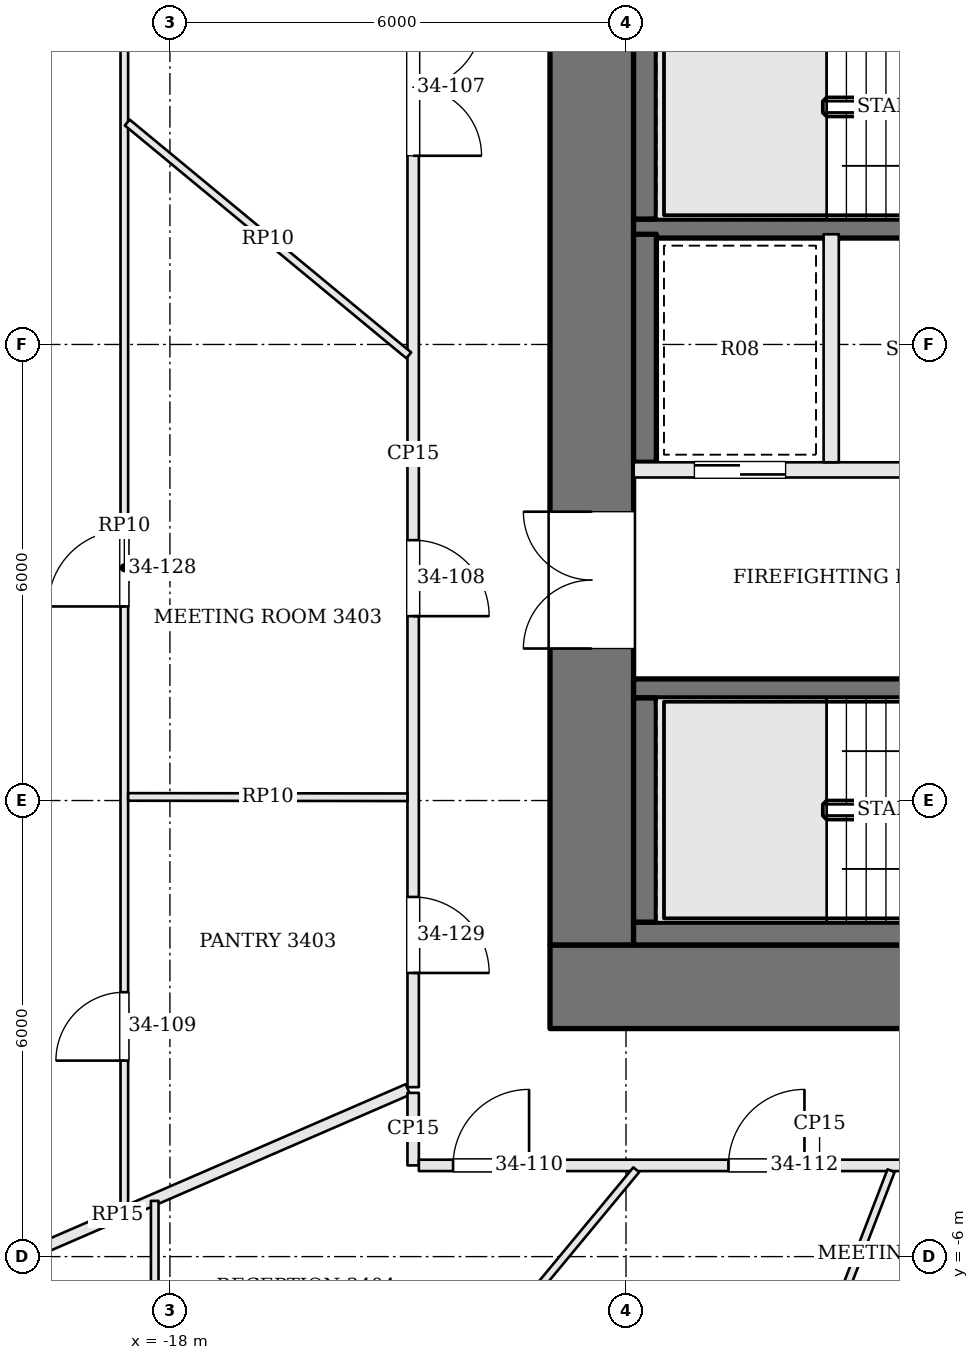
"""IFC4 building model, lengths in metres.
Left out: names, types, materials, properties, quantities, classifications, styles, units other than length and angle.
Written with IfcOpenShell. Run it as: python <this file> out.ifc"""

import sys

from ifc_helpers import new_model, si_unit, direction, frame, frame_2d, origin, place, context, subcontext, project, spatial, rectangle, extrude, element, fill, save


model = new_model("IFC4")
c1 = context("Model", 3, precision=1e-05, world=origin(), true_north=direction((0.0, 1.0)))
c2 = subcontext(c1, "Body", "Model", "MODEL_VIEW")
j1 = project(units=[si_unit("LENGTHUNIT", "METRE"), si_unit("PLANEANGLEUNIT", "RADIAN")], contexts=[c1])
p1 = place(None, origin())
s1 = spatial("IfcSite", under=j1, at=p1, CompositionType="ELEMENT")
p2 = place(p1, origin())
s2 = spatial("IfcBuilding", under=s1, at=p2, CompositionType="ELEMENT")
p3 = place(p2, frame((0.0, 0.0, 142.2)))
s3 = spatial("IfcBuildingStorey", under=s2, at=p3, CompositionType="ELEMENT", Elevation=142.2)
p4 = place(p3, frame((-13.0, -2.45, 0.0), z_axis=(0.0, 0.0, 1.0), x_axis=(1.0, 0.0, 0.0)))
e1 = element("IfcWall", 1, at=p4, inside=s3, PredefinedType="SHEAR", context=c2, shape_type="SweptSolid", body=[
    extrude(rectangle(XDim=26.0, YDim=1.1, at=frame_2d((13.0, 0.0))), origin(), (0.0, 0.0, 1.0), 3.9),
])
p5 = place(p4, frame((9.275, 0.0, 0.0)))
e2 = element("IfcOpeningElement", 2, at=p5, cuts=e1, PredefinedType="OPENING", context=c2, shape_type="SweptSolid", body=[
    extrude(rectangle(XDim=0.9, YDim=2.1, at=frame_2d((0.45, 1.05))), frame((0.0, 0.56, 0.0), z_axis=(0.0, -1.0, 0.0), x_axis=(1.0, 0.0, 0.0)), (0.0, 0.0, 1.0), 1.12),
])
p6 = place(p4, frame((11.75, 0.0, 0.0)))
e3 = element("IfcOpeningElement", 3, at=p6, cuts=e1, PredefinedType="OPENING", context=c2, shape_type="SweptSolid", body=[
    extrude(rectangle(XDim=1.0, YDim=2.1, at=frame_2d((0.5, 1.05))), frame((0.0, 0.56, 0.0), z_axis=(0.0, -1.0, 0.0), x_axis=(1.0, 0.0, 0.0)), (0.0, 0.0, 1.0), 1.12),
])
p7 = place(p4, frame((14.325, 0.0, 0.0)))
e4 = element("IfcOpeningElement", 4, at=p7, cuts=e1, PredefinedType="OPENING", context=c2, shape_type="SweptSolid", body=[
    extrude(rectangle(XDim=0.9, YDim=2.1, at=frame_2d((0.45, 1.05))), frame((0.0, 0.56, 0.0), z_axis=(0.0, -1.0, 0.0), x_axis=(1.0, 0.0, 0.0)), (0.0, 0.0, 1.0), 1.12),
])
p8 = place(p4, frame((16.7, 0.0, 0.0)))
e5 = element("IfcOpeningElement", 5, at=p8, cuts=e1, PredefinedType="OPENING", context=c2, shape_type="SweptSolid", body=[
    extrude(rectangle(XDim=0.9, YDim=2.1, at=frame_2d((0.45, 1.05))), frame((0.0, 0.56, 0.0), z_axis=(0.0, -1.0, 0.0), x_axis=(1.0, 0.0, 0.0)), (0.0, 0.0, 1.0), 1.12),
])
p9 = place(p3, frame((-12.45, -1.9, 0.0), z_axis=(0.0, 0.0, 1.0), x_axis=(0.0, 1.0, 0.0)))
e6 = element("IfcWall", 6, at=p9, inside=s3, PredefinedType="SHEAR", context=c2, shape_type="SweptSolid", body=[
    extrude(rectangle(XDim=12.8, YDim=1.1, at=frame_2d((6.4, 0.0))), origin(), (0.0, 0.0, 1.0), 3.9),
])
p10 = place(p9, frame((3.9, 0.0, 0.0)))
e7 = element("IfcOpeningElement", 7, at=p10, cuts=e6, PredefinedType="OPENING", context=c2, shape_type="SweptSolid", body=[
    extrude(rectangle(XDim=1.8, YDim=2.1, at=frame_2d((0.9, 1.05))), frame((0.0, 0.56, 0.0), z_axis=(0.0, -1.0, 0.0), x_axis=(1.0, 0.0, 0.0)), (0.0, 0.0, 1.0), 1.12),
])
p11 = place(p3, frame((-11.9, 1.475, 0.0), z_axis=(0.0, 0.0, 1.0), x_axis=(1.0, 0.0, 0.0)))
e8 = element("IfcWall", 8, at=p11, inside=s3, PredefinedType="SOLIDWALL", context=c2, shape_type="SweptSolid", body=[
    extrude(rectangle(XDim=6.8, YDim=0.25, at=frame_2d((3.4, 0.0))), origin(), (0.0, 0.0, 1.0), 3.7),
])
p12 = place(p11, frame((5.5, 0.0, 0.0)))
e9 = element("IfcOpeningElement", 9, at=p12, cuts=e8, PredefinedType="OPENING", context=c2, shape_type="SweptSolid", body=[
    extrude(rectangle(XDim=1.2, YDim=2.1, at=frame_2d((0.6, 1.05))), frame((0.0, 0.135, 0.0), z_axis=(0.0, -1.0, 0.0), x_axis=(1.0, 0.0, 0.0)), (0.0, 0.0, 1.0), 0.27),
])
p13 = place(p3, frame((-11.9, 4.35, 0.0), z_axis=(0.0, 0.0, 1.0), x_axis=(1.0, 0.0, 0.0)))
e10 = element("IfcWall", 10, at=p13, inside=s3, PredefinedType="SOLIDWALL", context=c2, shape_type="SweptSolid", body=[
    extrude(rectangle(XDim=6.8, YDim=0.2, at=frame_2d((3.4, 0.0))), origin(), (0.0, 0.0, 1.0), 3.7),
])
p14 = place(p13, frame((4.1, 0.0, 0.0)))
e11 = element("IfcOpeningElement", 11, at=p14, cuts=e10, PredefinedType="OPENING", context=c2, shape_type="SweptSolid", body=[
    extrude(rectangle(XDim=1.2, YDim=2.1, at=frame_2d((0.6, 1.05))), frame((0.0, 0.11, 0.0), z_axis=(0.0, -1.0, 0.0), x_axis=(1.0, 0.0, 0.0)), (0.0, 0.0, 1.0), 0.22),
])
p15 = place(p13, frame((0.8, 0.0, 0.0)))
e12 = element("IfcOpeningElement", 12, at=p15, cuts=e10, PredefinedType="OPENING", context=c2, shape_type="SweptSolid", body=[
    extrude(rectangle(XDim=1.2, YDim=2.1, at=frame_2d((0.6, 1.05))), frame((0.0, 0.11, 0.0), z_axis=(0.0, -1.0, 0.0), x_axis=(1.0, 0.0, 0.0)), (0.0, 0.0, 1.0), 0.22),
])
p16 = place(p3, frame((-11.9, 7.525, 0.0), z_axis=(0.0, 0.0, 1.0), x_axis=(1.0, 0.0, 0.0)))
e13 = element("IfcWall", 13, at=p16, inside=s3, PredefinedType="SOLIDWALL", context=c2, shape_type="SweptSolid", body=[
    extrude(rectangle(XDim=6.8, YDim=0.25, at=frame_2d((3.4, 0.0))), origin(), (0.0, 0.0, 1.0), 3.7),
])
p17 = place(p16, frame((5.5, 0.0, 0.0)))
e14 = element("IfcOpeningElement", 14, at=p17, cuts=e13, PredefinedType="OPENING", context=c2, shape_type="SweptSolid", body=[
    extrude(rectangle(XDim=1.2, YDim=2.1, at=frame_2d((0.6, 1.05))), frame((0.0, 0.135, 0.0), z_axis=(0.0, -1.0, 0.0), x_axis=(1.0, 0.0, 0.0)), (0.0, 0.0, 1.0), 0.27),
])
p18 = place(p3, frame((-9.3, 4.45, 0.0), z_axis=(0.0, 0.0, 1.0), x_axis=(0.0, 1.0, 0.0)))
e15 = element("IfcWall", 15, at=p18, inside=s3, PredefinedType="SOLIDWALL", context=c2, shape_type="SweptSolid", body=[
    extrude(rectangle(XDim=3.0, YDim=0.2, at=frame_2d((1.5, 0.0))), origin(), (0.0, 0.0, 1.0), 3.7),
])
p19 = place(p3, frame((-11.9, -1.75, 0.0), z_axis=(0.0, 0.0, 1.0), x_axis=(1.0, 0.0, 0.0)))
e16 = element("IfcWall", 16, at=p19, inside=s3, PredefinedType="SOLIDWALL", context=c2, shape_type="SweptSolid", body=[
    extrude(rectangle(XDim=6.8, YDim=0.3, at=frame_2d((3.4, 0.0))), origin(), (0.0, 0.0, 1.0), 3.7),
])
p20 = place(p3, frame((-11.75, -1.6, 0.0), z_axis=(0.0, 0.0, 1.0), x_axis=(0.0, 1.0, 0.0)))
e17 = element("IfcWall", 17, at=p20, inside=s3, PredefinedType="SOLIDWALL", context=c2, shape_type="SweptSolid", body=[
    extrude(rectangle(XDim=2.95, YDim=0.3, at=frame_2d((1.475, 0.0))), origin(), (0.0, 0.0, 1.0), 3.7),
])
p21 = place(p3, frame((-11.75, 4.45, 0.0), z_axis=(0.0, 0.0, 1.0), x_axis=(0.0, 1.0, 0.0)))
e18 = element("IfcWall", 18, at=p21, inside=s3, PredefinedType="SOLIDWALL", context=c2, shape_type="SweptSolid", body=[
    extrude(rectangle(XDim=3.0, YDim=0.3, at=frame_2d((1.5, 0.0))), origin(), (0.0, 0.0, 1.0), 3.7),
])
p22 = place(p3, frame((-11.75, 7.65, 0.0), z_axis=(0.0, 0.0, 1.0), x_axis=(0.0, 1.0, 0.0)))
e19 = element("IfcWall", 19, at=p22, inside=s3, PredefinedType="SOLIDWALL", context=c2, shape_type="SweptSolid", body=[
    extrude(rectangle(XDim=2.95, YDim=0.3, at=frame_2d((1.475, 0.0))), origin(), (0.0, 0.0, 1.0), 3.7),
])
p23 = place(p3, frame((-14.8, 12.882, 0.0), z_axis=(0.0, 0.0, 1.0), x_axis=(0.0, -1.0, 0.0)))
e20 = element("IfcWall", 20, at=p23, inside=s3, PredefinedType="PARTITIONING", context=c2, shape_type="SweptSolid", body=[
    extrude(rectangle(XDim=16.652, YDim=0.15, at=frame_2d((8.326, 0.0))), origin(), (0.0, 0.0, 1.0), 3.198),
])
p24 = place(p23, frame((2.599, 0.0, 0.0)))
e21 = element("IfcOpeningElement", 21, at=p24, cuts=e20, PredefinedType="OPENING", context=c2, shape_type="SweptSolid", body=[
    extrude(rectangle(XDim=1.8, YDim=2.1, at=frame_2d((0.9, 1.05))), frame((0.0, 0.085, 0.0), z_axis=(0.0, -1.0, 0.0), x_axis=(1.0, 0.0, 0.0)), (0.0, 0.0, 1.0), 0.17),
])
p25 = place(p23, frame((9.456, 0.0, 0.0)))
e22 = element("IfcOpeningElement", 22, at=p25, cuts=e20, PredefinedType="OPENING", context=c2, shape_type="SweptSolid", body=[
    extrude(rectangle(XDim=1.0, YDim=2.4, at=frame_2d((0.5, 1.2))), frame((0.0, 0.085, 0.0), z_axis=(0.0, -1.0, 0.0), x_axis=(1.0, 0.0, 0.0)), (0.0, 0.0, 1.0), 0.17),
])
p26 = place(p23, frame((14.15, 0.0, 0.0)))
e23 = element("IfcOpeningElement", 23, at=p26, cuts=e20, PredefinedType="OPENING", context=c2, shape_type="SweptSolid", body=[
    extrude(rectangle(XDim=1.0, YDim=2.1, at=frame_2d((0.5, 1.05))), frame((0.0, 0.085, 0.0), z_axis=(0.0, -1.0, 0.0), x_axis=(1.0, 0.0, 0.0)), (0.0, 0.0, 1.0), 0.17),
])
p27 = place(p3, frame((-22.514, -7.116, 0.0), z_axis=(0.0, 0.0, 1.0), x_axis=(0.917457618692, 0.397833530392, 0.0)))
e24 = element("IfcWall", 24, at=p27, inside=s3, PredefinedType="PARTITIONING", context=c2, shape_type="SweptSolid", body=[
    extrude(rectangle(XDim=8.333, YDim=0.15, at=frame_2d((4.167, 0.0))), origin(), (0.0, 0.0, 1.0), 3.198),
])
p28 = place(p3, frame((-14.8, -3.846, 0.0), z_axis=(0.0, 0.0, 1.0), x_axis=(0.0, -1.0, 0.0)))
e25 = element("IfcWall", 25, at=p28, inside=s3, PredefinedType="PARTITIONING", context=c2, shape_type="SweptSolid", body=[
    extrude(rectangle(XDim=0.954, YDim=0.15, at=frame_2d((0.477, 0.0))), origin(), (0.0, 0.0, 1.0), 3.198),
])
p29 = place(p3, frame((-14.725, -4.8, 0.0), z_axis=(0.0, 0.0, 1.0), x_axis=(1.0, 0.0, 0.0)))
e26 = element("IfcWall", 26, at=p29, inside=s3, PredefinedType="PARTITIONING", context=c2, shape_type="SweptSolid", body=[
    extrude(rectangle(XDim=10.544, YDim=0.15, at=frame_2d((5.272, 0.0))), origin(), (0.0, 0.0, 1.0), 3.198),
])
p30 = place(p29, frame((0.45, 0.0, 0.0)))
e27 = element("IfcOpeningElement", 27, at=p30, cuts=e26, PredefinedType="OPENING", context=c2, shape_type="SweptSolid", body=[
    extrude(rectangle(XDim=1.0, YDim=2.1, at=frame_2d((0.5, 1.05))), frame((0.0, 0.085, 0.0), z_axis=(0.0, -1.0, 0.0), x_axis=(1.0, 0.0, 0.0)), (0.0, 0.0, 1.0), 0.17),
])
p31 = place(p29, frame((4.073, 0.0, 0.0)))
e28 = element("IfcOpeningElement", 28, at=p31, cuts=e26, PredefinedType="OPENING", context=c2, shape_type="SweptSolid", body=[
    extrude(rectangle(XDim=1.0, YDim=2.4, at=frame_2d((0.5, 1.2))), frame((0.0, 0.085, 0.0), z_axis=(0.0, -1.0, 0.0), x_axis=(1.0, 0.0, 0.0)), (0.0, 0.0, 1.0), 0.17),
])
p32 = place(p29, frame((6.764, 0.0, 0.0)))
e29 = element("IfcOpeningElement", 29, at=p32, cuts=e26, PredefinedType="OPENING", context=c2, shape_type="SweptSolid", body=[
    extrude(rectangle(XDim=1.0, YDim=2.4, at=frame_2d((0.5, 1.2))), frame((0.0, 0.085, 0.0), z_axis=(0.0, -1.0, 0.0), x_axis=(1.0, 0.0, 0.0)), (0.0, 0.0, 1.0), 0.17),
])
p33 = place(p29, frame((8.916, 0.0, 0.0)))
e30 = element("IfcOpeningElement", 30, at=p33, cuts=e26, PredefinedType="OPENING", context=c2, shape_type="SweptSolid", body=[
    extrude(rectangle(XDim=1.0, YDim=2.4, at=frame_2d((0.5, 1.2))), frame((0.0, 0.085, 0.0), z_axis=(0.0, -1.0, 0.0), x_axis=(1.0, 0.0, 0.0)), (0.0, 0.0, 1.0), 0.17),
])
p34 = place(p3, frame((-18.6, -5.397, 0.0), z_axis=(0.0, 0.0, 1.0), x_axis=(0.0, 1.0, 0.0)))
e31 = element("IfcWall", 31, at=p34, inside=s3, PredefinedType="PARTITIONING", context=c2, shape_type="SweptSolid", body=[
    extrude(rectangle(XDim=16.919, YDim=0.1, at=frame_2d((8.459, 0.0))), origin(), (0.0, 0.0, 1.0), 3.184),
])
p35 = place(p34, frame((1.975, 0.0, 0.0)))
e32 = element("IfcOpeningElement", 32, at=p35, cuts=e31, PredefinedType="OPENING", context=c2, shape_type="SweptSolid", body=[
    extrude(rectangle(XDim=0.9, YDim=2.1, at=frame_2d((0.45, 1.05))), frame((0.0, 0.06, 0.0), z_axis=(0.0, -1.0, 0.0), x_axis=(1.0, 0.0, 0.0)), (0.0, 0.0, 1.0), 0.12),
])
p36 = place(p34, frame((7.95, 0.0, 0.0)))
e33 = element("IfcOpeningElement", 33, at=p36, cuts=e31, PredefinedType="OPENING", context=c2, shape_type="SweptSolid", body=[
    extrude(rectangle(XDim=1.0, YDim=2.4, at=frame_2d((0.5, 1.2))), frame((0.0, 0.06, 0.0), z_axis=(0.0, -1.0, 0.0), x_axis=(1.0, 0.0, 0.0)), (0.0, 0.0, 1.0), 0.12),
])
p37 = place(p3, frame((-14.858, 5.857, 0.0), z_axis=(0.0, 0.0, 1.0), x_axis=(-0.770605931108, 0.637311932213, 0.0)))
e34 = element("IfcWall", 34, at=p37, inside=s3, PredefinedType="PARTITIONING", context=c2, shape_type="SweptSolid", body=[
    extrude(rectangle(XDim=4.806, YDim=0.1, at=frame_2d((2.403, 0.0))), origin(), (0.0, 0.0, 1.0), 3.184),
])
p38 = place(p3, frame((-14.875, 0.043, 0.0), z_axis=(0.0, 0.0, 1.0), x_axis=(-0.999999285062, 0.001195774074, 0.0)))
e35 = element("IfcWall", 35, at=p38, inside=s3, PredefinedType="PARTITIONING", context=c2, shape_type="SweptSolid", body=[
    extrude(rectangle(XDim=3.675, YDim=0.1, at=frame_2d((1.837, 0.0))), origin(), (0.0, 0.0, 1.0), 3.184),
])
p39 = place(p3, frame((-18.2, -8.2, 0.0), z_axis=(0.0, 0.0, 1.0), x_axis=(0.0, 1.0, 0.0)))
e36 = element("IfcWall", 36, at=p39, inside=s3, PredefinedType="PARTITIONING", context=c2, shape_type="SweptSolid", body=[
    extrude(rectangle(XDim=2.933, YDim=0.1, at=frame_2d((1.467, 0.0))), origin(), (0.0, 0.0, 1.0), 3.184),
])
p40 = place(p39, frame((0.5, 0.0, 0.0)))
e37 = element("IfcOpeningElement", 37, at=p40, cuts=e36, PredefinedType="OPENING", context=c2, shape_type="SweptSolid", body=[
    extrude(rectangle(XDim=1.0, YDim=2.1, at=frame_2d((0.5, 1.05))), frame((0.0, 0.06, 0.0), z_axis=(0.0, -1.0, 0.0), x_axis=(1.0, 0.0, 0.0)), (0.0, 0.0, 1.0), 0.12),
])
p41 = place(p3, frame((-11.865, -4.858, 0.0), z_axis=(0.0, 0.0, 1.0), x_axis=(-0.638010152626, -0.770027950886, 0.0)))
e38 = element("IfcWall", 38, at=p41, inside=s3, PredefinedType="PARTITIONING", context=c2, shape_type="SweptSolid", body=[
    extrude(rectangle(XDim=4.29, YDim=0.1, at=frame_2d((2.145, 0.0))), origin(), (0.0, 0.0, 1.0), 3.184),
])
p42 = place(p3, frame((-8.513, -4.87, 0.0), z_axis=(0.0, 0.0, 1.0), x_axis=(-0.359444024243, -0.933166648266, 0.0)))
e39 = element("IfcWall", 39, at=p42, inside=s3, PredefinedType="PARTITIONING", context=c2, shape_type="SweptSolid", body=[
    extrude(rectangle(XDim=3.518, YDim=0.1, at=frame_2d((1.759, 0.0))), origin(), (0.0, 0.0, 1.0), 3.184),
])
p43 = place(p10, origin())
e40 = element("IfcDoor", 40, at=p43, inside=s3, OperationType="DOUBLE_DOOR_SINGLE_SWING", PredefinedType="DOOR", context=c2, shape_type="SweptSolid", body=[
    extrude(rectangle(XDim=1.8, YDim=2.1, at=frame_2d((0.9, 1.05))), frame((0.0, 0.025, 0.0), z_axis=(0.0, -1.0, 0.0), x_axis=(1.0, 0.0, 0.0)), (0.0, 0.0, 1.0), 0.05),
])
fill(e7, e40)
p44 = place(p15, origin())
e41 = element("IfcDoor", 41, at=p44, inside=s3, OperationType="SLIDING_TO_RIGHT", PredefinedType="DOOR", context=c2, shape_type="SweptSolid", body=[
    extrude(rectangle(XDim=1.2, YDim=2.1, at=frame_2d((0.6, 1.05))), frame((0.0, 0.025, 0.0), z_axis=(0.0, -1.0, 0.0), x_axis=(1.0, 0.0, 0.0)), (0.0, 0.0, 1.0), 0.05),
])
fill(e12, e41)
p45 = place(p24, origin())
e42 = element("IfcDoor", 42, at=p45, inside=s3, OperationType="DOUBLE_DOOR_SINGLE_SWING", PredefinedType="DOOR", context=c2, shape_type="SweptSolid", body=[
    extrude(rectangle(XDim=1.8, YDim=2.1, at=frame_2d((0.9, 1.05))), frame((0.0, 0.025, 0.0), z_axis=(0.0, -1.0, 0.0), x_axis=(1.0, 0.0, 0.0)), (0.0, 0.0, 1.0), 0.05),
])
fill(e21, e42)
p46 = place(p25, origin())
e43 = element("IfcDoor", 43, at=p46, inside=s3, OperationType="SINGLE_SWING_RIGHT", PredefinedType="DOOR", context=c2, shape_type="SweptSolid", body=[
    extrude(rectangle(XDim=1.0, YDim=2.4, at=frame_2d((0.5, 1.2))), frame((0.0, 0.025, 0.0), z_axis=(0.0, -1.0, 0.0), x_axis=(1.0, 0.0, 0.0)), (0.0, 0.0, 1.0), 0.05),
])
fill(e22, e43)
p47 = place(p35, origin())
e44 = element("IfcDoor", 44, at=p47, inside=s3, OperationType="SINGLE_SWING_LEFT", PredefinedType="DOOR", context=c2, shape_type="SweptSolid", body=[
    extrude(rectangle(XDim=0.9, YDim=2.1, at=frame_2d((0.45, 1.05))), frame((0.0, 0.025, 0.0), z_axis=(0.0, -1.0, 0.0), x_axis=(1.0, 0.0, 0.0)), (0.0, 0.0, 1.0), 0.05),
])
fill(e32, e44)
p48 = place(p30, origin())
e45 = element("IfcDoor", 45, at=p48, inside=s3, OperationType="SINGLE_SWING_RIGHT", PredefinedType="DOOR", context=c2, shape_type="SweptSolid", body=[
    extrude(rectangle(XDim=1.0, YDim=2.1, at=frame_2d((0.5, 1.05))), frame((0.0, 0.025, 0.0), z_axis=(0.0, -1.0, 0.0), x_axis=(1.0, 0.0, 0.0)), (0.0, 0.0, 1.0), 0.05),
])
fill(e27, e45)
p49 = place(p31, origin())
e46 = element("IfcDoor", 46, at=p49, inside=s3, OperationType="SINGLE_SWING_RIGHT", PredefinedType="DOOR", context=c2, shape_type="SweptSolid", body=[
    extrude(rectangle(XDim=1.0, YDim=2.4, at=frame_2d((0.5, 1.2))), frame((0.0, 0.025, 0.0), z_axis=(0.0, -1.0, 0.0), x_axis=(1.0, 0.0, 0.0)), (0.0, 0.0, 1.0), 0.05),
])
fill(e28, e46)
p50 = place(p36, origin())
e47 = element("IfcDoor", 47, at=p50, inside=s3, OperationType="SINGLE_SWING_LEFT", PredefinedType="DOOR", context=c2, shape_type="SweptSolid", body=[
    extrude(rectangle(XDim=1.0, YDim=2.4, at=frame_2d((0.5, 1.2))), frame((0.0, 0.025, 0.0), z_axis=(0.0, -1.0, 0.0), x_axis=(1.0, 0.0, 0.0)), (0.0, 0.0, 1.0), 0.05),
])
fill(e33, e47)
p51 = place(p26, origin())
e48 = element("IfcDoor", 48, at=p51, inside=s3, OperationType="SINGLE_SWING_RIGHT", PredefinedType="DOOR", context=c2, shape_type="SweptSolid", body=[
    extrude(rectangle(XDim=1.0, YDim=2.1, at=frame_2d((0.5, 1.05))), frame((0.0, 0.025, 0.0), z_axis=(0.0, -1.0, 0.0), x_axis=(1.0, 0.0, 0.0)), (0.0, 0.0, 1.0), 0.05),
])
fill(e23, e48)
save(model, sys.argv[1])
